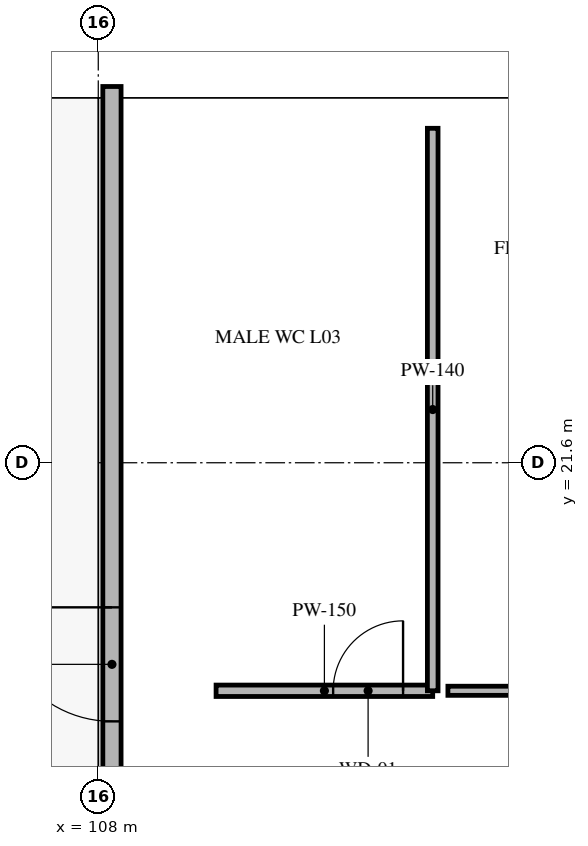
"""IFC4 building model, lengths in metres.
Left out: names, types, materials, properties, quantities, classifications, styles, units other than length and angle.
Written with IfcOpenShell. Run it as: python <this file> out.ifc"""

import sys

from ifc_helpers import new_model, si_unit, direction, frame, frame_2d, origin, place, context, subcontext, project, spatial, rectangle, extrude, element, fill, save


model = new_model("IFC4")
c1 = context("Model", 3, precision=1e-05, world=origin(), true_north=direction((0.0, 1.0)))
c2 = subcontext(c1, "Body", "Model", "MODEL_VIEW")
j1 = project(units=[si_unit("LENGTHUNIT", "METRE"), si_unit("PLANEANGLEUNIT", "RADIAN")], contexts=[c1])
p1 = place(None, origin())
s1 = spatial("IfcSite", under=j1, at=p1, CompositionType="ELEMENT")
p2 = place(p1, origin())
s2 = spatial("IfcBuilding", under=s1, at=p2, CompositionType="ELEMENT")
p3 = place(p2, frame((0.0, 0.0, 12.9)))
s3 = spatial("IfcBuildingStorey", under=s2, at=p3, CompositionType="ELEMENT", Elevation=12.9)
p4 = place(p3, frame((107.85, 26.22, 0.0), z_axis=(0.0, 0.0, 1.0), x_axis=(1.0, 0.0, 0.0)))
e1 = element("IfcWall", 1, at=p4, inside=s3, PredefinedType="SOLIDWALL", context=c2, shape_type="SweptSolid", body=[
    extrude(rectangle(XDim=65.1, YDim=0.26, at=frame_2d((32.55, 0.0))), origin(), (0.0, 0.0, 1.0), 3.66),
])
p5 = place(p4, frame((31.5, 0.0, 0.75)))
e2 = element("IfcOpeningElement", 2, at=p5, cuts=e1, PredefinedType="OPENING", context=c2, shape_type="SweptSolid", body=[
    extrude(rectangle(XDim=2.1, YDim=1.65, at=frame_2d((1.05, 0.825))), frame((0.0, 0.14, 0.0), z_axis=(0.0, -1.0, 0.0), x_axis=(1.0, 0.0, 0.0)), (0.0, 0.0, 1.0), 0.28),
])
p6 = place(p3, frame((108.18, 11.346, 0.0), z_axis=(0.0, 0.0, 1.0), x_axis=(0.0, 1.0, 0.0)))
e3 = element("IfcWall", 3, at=p6, inside=s3, PredefinedType="SOLIDWALL", context=c2, shape_type="SweptSolid", body=[
    extrude(rectangle(XDim=15.204, YDim=0.24, at=frame_2d((7.602, 0.0))), origin(), (0.0, 0.0, 1.0), 3.66),
])
p7 = place(p6, frame((6.852, 0.0, 0.0)))
e4 = element("IfcOpeningElement", 4, at=p7, cuts=e3, PredefinedType="OPENING", context=c2, shape_type="SweptSolid", body=[
    extrude(rectangle(XDim=1.5, YDim=2.2, at=frame_2d((0.75, 1.1))), frame((0.0, 0.13, 0.0), z_axis=(0.0, -1.0, 0.0), x_axis=(1.0, 0.0, 0.0)), (0.0, 0.0, 1.0), 0.26),
])
p8 = place(p3, frame((109.55, 18.6, 0.0), z_axis=(0.0, 0.0, 1.0), x_axis=(1.0, 0.0, 0.0)))
e5 = element("IfcWall", 5, at=p8, inside=s3, PredefinedType="PARTITIONING", context=c2, shape_type="SweptSolid", body=[
    extrude(rectangle(XDim=2.85, YDim=0.15, at=frame_2d((1.425, 0.0))), origin(), (0.0, 0.0, 1.0), 3.66),
])
p9 = place(p8, frame((1.54, 0.0, 0.0)))
e6 = element("IfcOpeningElement", 6, at=p9, cuts=e5, PredefinedType="OPENING", context=c2, shape_type="SweptSolid", body=[
    extrude(rectangle(XDim=0.92, YDim=2.1, at=frame_2d((0.46, 1.05))), frame((0.0, 0.085, 0.0), z_axis=(0.0, -1.0, 0.0), x_axis=(1.0, 0.0, 0.0)), (0.0, 0.0, 1.0), 0.17),
])
p10 = place(p3, frame((112.4, 18.6, 0.0), z_axis=(0.0, 0.0, 1.0), x_axis=(0.0, 1.0, 0.0)))
e7 = element("IfcWall", 7, at=p10, inside=s3, PredefinedType="PARTITIONING", context=c2, shape_type="SweptSolid", body=[
    extrude(rectangle(XDim=7.4, YDim=0.14, at=frame_2d((3.7, 0.0))), origin(), (0.0, 0.0, 1.0), 3.66),
])
p11 = place(p3, frame((112.6, 18.6, 0.0), z_axis=(0.0, 0.0, 1.0), x_axis=(1.0, 0.0, 0.0)))
e8 = element("IfcWall", 8, at=p11, inside=s3, PredefinedType="PARTITIONING", context=c2, shape_type="SweptSolid", body=[
    extrude(rectangle(XDim=3.05, YDim=0.12, at=frame_2d((1.525, 0.0))), origin(), (0.0, 0.0, 1.0), 3.01),
])
p12 = place(p11, frame((1.66, 0.0, 0.0)))
e9 = element("IfcOpeningElement", 9, at=p12, cuts=e8, PredefinedType="OPENING", context=c2, shape_type="SweptSolid", body=[
    extrude(rectangle(XDim=0.88, YDim=2.1, at=frame_2d((0.44, 1.05))), frame((0.0, 0.07, 0.0), z_axis=(0.0, -1.0, 0.0), x_axis=(1.0, 0.0, 0.0)), (0.0, 0.0, 1.0), 0.14),
])
p13 = place(p7, origin())
e10 = element("IfcDoor", 10, at=p13, inside=s3, OperationType="SINGLE_SWING_RIGHT", PredefinedType="DOOR", context=c2, shape_type="SweptSolid", body=[
    extrude(rectangle(XDim=1.5, YDim=2.2, at=frame_2d((0.75, 1.1))), frame((0.0, 0.025, 0.0), z_axis=(0.0, -1.0, 0.0), x_axis=(1.0, 0.0, 0.0)), (0.0, 0.0, 1.0), 0.05),
])
fill(e4, e10)
p14 = place(p9, origin())
e11 = element("IfcDoor", 11, at=p14, inside=s3, OperationType="SINGLE_SWING_RIGHT", PredefinedType="DOOR", context=c2, shape_type="SweptSolid", body=[
    extrude(rectangle(XDim=0.92, YDim=2.1, at=frame_2d((0.46, 1.05))), frame((0.0, 0.025, 0.0), z_axis=(0.0, -1.0, 0.0), x_axis=(1.0, 0.0, 0.0)), (0.0, 0.0, 1.0), 0.05),
])
fill(e6, e11)
save(model, sys.argv[1])
